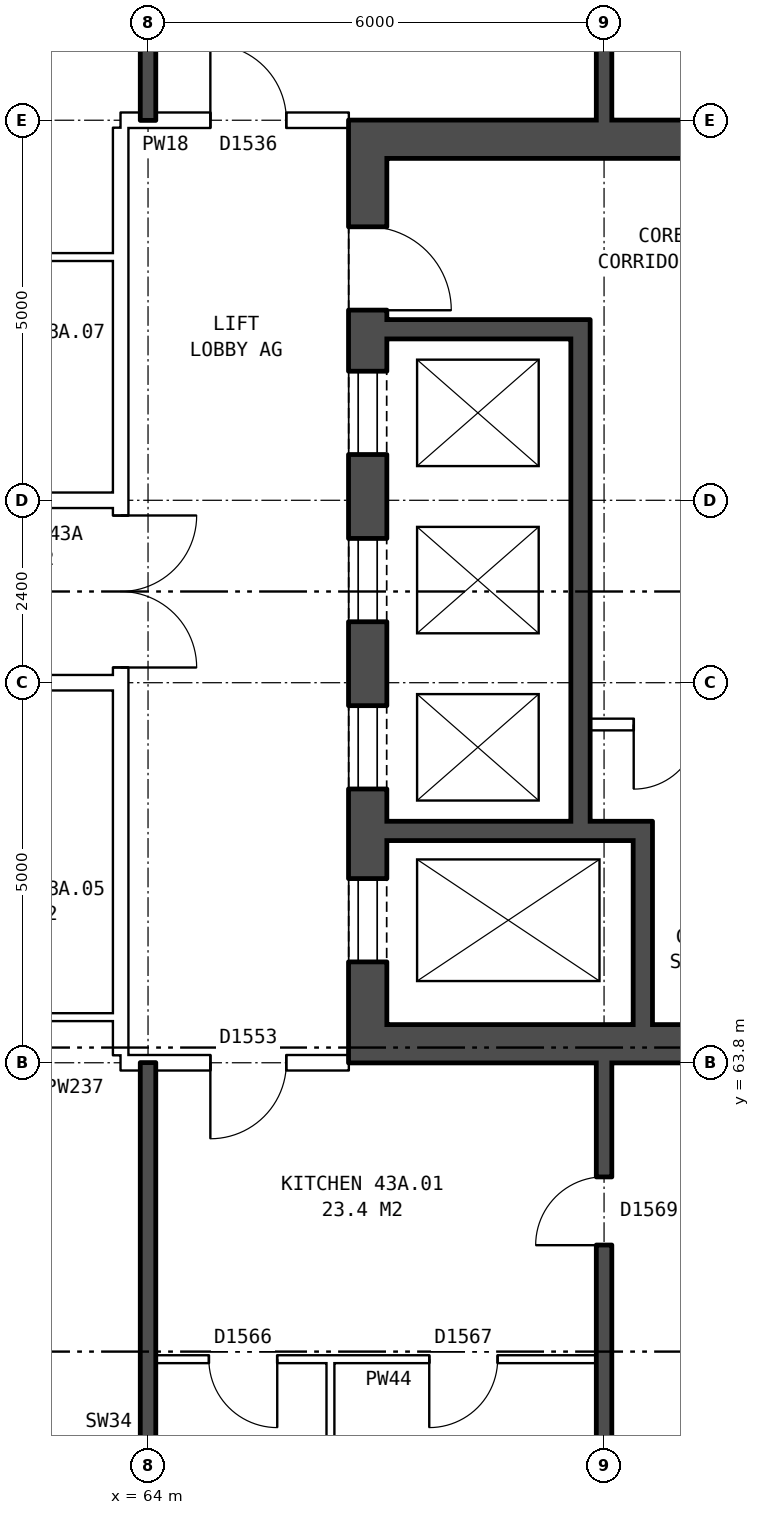
"""IFC4 building model, lengths in metres.
Left out: names, types, materials, properties, quantities, classifications, styles, units other than length and angle.
Written with IfcOpenShell. Run it as: python <this file> out.ifc"""

import sys

from ifc_helpers import new_model, si_unit, direction, frame, frame_2d, origin, place, context, subcontext, project, spatial, rectangle, extrude, element, fill, save


model = new_model("IFC4")
c1 = context("Model", 3, precision=1e-05, world=origin(), true_north=direction((0.0, 1.0)))
c2 = subcontext(c1, "Body", "Model", "MODEL_VIEW")
j1 = project(units=[si_unit("LENGTHUNIT", "METRE"), si_unit("PLANEANGLEUNIT", "RADIAN")], contexts=[c1])
p1 = place(None, origin())
s1 = spatial("IfcSite", under=j1, at=p1, CompositionType="ELEMENT")
p2 = place(p1, origin())
s2 = spatial("IfcBuilding", under=s1, at=p2, CompositionType="ELEMENT")
p3 = place(p2, frame((0.0, 0.0, 154.7)))
s3 = spatial("IfcBuildingStorey", under=s2, at=p3, CompositionType="ELEMENT", Elevation=154.7)
p4 = place(p3, frame((66.89, 63.8, 0.0), z_axis=(0.0, 0.0, 1.0), x_axis=(0.0, 1.0, 0.0)))
e1 = element("IfcWall", 1, at=p4, inside=s3, PredefinedType="SHEAR", context=c2, shape_type="SweptSolid", body=[
    extrude(rectangle(XDim=12.4, YDim=0.5, at=frame_2d((6.2, 0.0))), origin(), (0.0, 0.0, 1.0), 2.85),
])
p5 = place(p4, frame((1.325, 0.0, 0.0)))
e2 = element("IfcOpeningElement", 2, at=p5, cuts=e1, PredefinedType="OPENING", context=c2, shape_type="SweptSolid", body=[
    extrude(rectangle(XDim=1.1, YDim=2.1, at=frame_2d((0.55, 1.05))), frame((0.0, 0.26, 0.0), z_axis=(0.0, -1.0, 0.0), x_axis=(1.0, 0.0, 0.0)), (0.0, 0.0, 1.0), 0.52),
])
p6 = place(p4, frame((3.6, 0.0, 0.0)))
e3 = element("IfcOpeningElement", 3, at=p6, cuts=e1, PredefinedType="OPENING", context=c2, shape_type="SweptSolid", body=[
    extrude(rectangle(XDim=1.1, YDim=2.1, at=frame_2d((0.55, 1.05))), frame((0.0, 0.26, 0.0), z_axis=(0.0, -1.0, 0.0), x_axis=(1.0, 0.0, 0.0)), (0.0, 0.0, 1.0), 0.52),
])
p7 = place(p4, frame((5.8, 0.0, 0.0)))
e4 = element("IfcOpeningElement", 4, at=p7, cuts=e1, PredefinedType="OPENING", context=c2, shape_type="SweptSolid", body=[
    extrude(rectangle(XDim=1.1, YDim=2.1, at=frame_2d((0.55, 1.05))), frame((0.0, 0.26, 0.0), z_axis=(0.0, -1.0, 0.0), x_axis=(1.0, 0.0, 0.0)), (0.0, 0.0, 1.0), 0.52),
])
p8 = place(p4, frame((8.0, 0.0, 0.0)))
e5 = element("IfcOpeningElement", 5, at=p8, cuts=e1, PredefinedType="OPENING", context=c2, shape_type="SweptSolid", body=[
    extrude(rectangle(XDim=1.1, YDim=2.1, at=frame_2d((0.55, 1.05))), frame((0.0, 0.26, 0.0), z_axis=(0.0, -1.0, 0.0), x_axis=(1.0, 0.0, 0.0)), (0.0, 0.0, 1.0), 0.52),
])
p9 = place(p4, frame((9.9, 0.0, 0.0)))
e6 = element("IfcOpeningElement", 6, at=p9, cuts=e1, PredefinedType="OPENING", context=c2, shape_type="SweptSolid", body=[
    extrude(rectangle(XDim=1.1, YDim=2.1, at=frame_2d((0.55, 1.05))), frame((0.0, 0.26, 0.0), z_axis=(0.0, -1.0, 0.0), x_axis=(1.0, 0.0, 0.0)), (0.0, 0.0, 1.0), 0.52),
])
for number, where, z_axis, x_axis in (
    (7, (67.14, 64.05, 0.0), (0.0, 0.0, 1.0), (1.0, 0.0, 0.0)),
    (8, (67.14, 75.95, 0.0), (0.0, 0.0, 1.0), (1.0, 0.0, 0.0)),
):
    element("IfcWall", number, at=place(p3, frame(where, z_axis=z_axis, x_axis=x_axis)), inside=s3, PredefinedType="SHEAR", context=c2, shape_type="SweptSolid", body=[
        extrude(rectangle(XDim=8.0, YDim=0.5, at=frame_2d((4.0, 0.0))), origin(), (0.0, 0.0, 1.0), 2.85),
    ])
p10 = place(p3, frame((67.14, 66.85, 0.0), z_axis=(0.0, 0.0, 1.0), x_axis=(1.0, 0.0, 0.0)))
e9 = element("IfcWall", 9, at=p10, inside=s3, PredefinedType="SHEAR", context=c2, shape_type="SweptSolid", body=[
    extrude(rectangle(XDim=3.495, YDim=0.25, at=frame_2d((1.748, 0.0))), origin(), (0.0, 0.0, 1.0), 2.85),
])
p11 = place(p3, frame((69.815, 68.25, 0.0), z_axis=(0.0, 0.0, 1.0), x_axis=(1.0, 0.0, 0.0)))
e10 = element("IfcWall", 10, at=p11, inside=s3, PredefinedType="PARTITIONING", context=c2, shape_type="SweptSolid", body=[
    extrude(rectangle(XDim=2.0, YDim=0.15, at=frame_2d((1.0, 0.0))), origin(), (0.0, 0.0, 1.0), 2.85),
])
p12 = place(p11, frame((0.575, 0.0, 0.0)))
e11 = element("IfcOpeningElement", 11, at=p12, cuts=e10, PredefinedType="OPENING", context=c2, shape_type="SweptSolid", body=[
    extrude(rectangle(XDim=0.85, YDim=2.1, at=frame_2d((0.425, 1.05))), frame((0.0, 0.085, 0.0), z_axis=(0.0, -1.0, 0.0), x_axis=(1.0, 0.0, 0.0)), (0.0, 0.0, 1.0), 0.17),
])
p13 = place(p3, frame((67.14, 73.45, 0.0), z_axis=(0.0, 0.0, 1.0), x_axis=(1.0, 0.0, 0.0)))
e12 = element("IfcWall", 12, at=p13, inside=s3, PredefinedType="SHEAR", context=c2, shape_type="SweptSolid", body=[
    extrude(rectangle(XDim=2.425, YDim=0.25, at=frame_2d((1.212, 0.0))), origin(), (0.0, 0.0, 1.0), 2.85),
])
p14 = place(p3, frame((69.69, 66.975, 0.0), z_axis=(0.0, 0.0, 1.0), x_axis=(0.0, 1.0, 0.0)))
e13 = element("IfcWall", 13, at=p14, inside=s3, PredefinedType="SHEAR", context=c2, shape_type="SweptSolid", body=[
    extrude(rectangle(XDim=6.6, YDim=0.25, at=frame_2d((3.3, 0.0))), origin(), (0.0, 0.0, 1.0), 2.85),
])
p15 = place(p3, frame((70.51, 64.3, 0.0), z_axis=(0.0, 0.0, 1.0), x_axis=(0.0, 1.0, 0.0)))
e14 = element("IfcWall", 14, at=p15, inside=s3, PredefinedType="SHEAR", context=c2, shape_type="SweptSolid", body=[
    extrude(rectangle(XDim=2.425, YDim=0.25, at=frame_2d((1.212, 0.0))), origin(), (0.0, 0.0, 1.0), 2.85),
])
p16 = place(p3, frame((63.64, 63.9, 0.0), z_axis=(0.0, 0.0, 1.0), x_axis=(0.0, 1.0, 0.0)))
e15 = element("IfcWall", 15, at=p16, inside=s3, PredefinedType="PARTITIONING", context=c2, shape_type="SweptSolid", body=[
    extrude(rectangle(XDim=12.2, YDim=0.2, at=frame_2d((6.1, 0.0))), origin(), (0.0, 0.0, 1.0), 2.85),
])
p17 = place(p16, frame((5.1, 0.0, 0.0)))
e16 = element("IfcOpeningElement", 16, at=p17, cuts=e15, PredefinedType="OPENING", context=c2, shape_type="SweptSolid", body=[
    extrude(rectangle(XDim=2.0, YDim=2.1, at=frame_2d((1.0, 1.05))), frame((0.0, 0.11, 0.0), z_axis=(0.0, -1.0, 0.0), x_axis=(1.0, 0.0, 0.0)), (0.0, 0.0, 1.0), 0.22),
])
p18 = place(p3, frame((64.1, 59.9, 0.0), z_axis=(0.0, 0.0, 1.0), x_axis=(1.0, 0.0, 0.0)))
e17 = element("IfcWall", 17, at=p18, inside=s3, PredefinedType="PARTITIONING", context=c2, shape_type="SweptSolid", body=[
    extrude(rectangle(XDim=5.8, YDim=0.1, at=frame_2d((2.9, 0.0))), origin(), (0.0, 0.0, 1.0), 2.85),
])
p19 = place(p18, frame((3.6, 0.0, 0.0)))
e18 = element("IfcOpeningElement", 18, at=p19, cuts=e17, PredefinedType="OPENING", context=c2, shape_type="SweptSolid", body=[
    extrude(rectangle(XDim=0.9, YDim=2.1, at=frame_2d((0.45, 1.05))), frame((0.0, 0.06, 0.0), z_axis=(0.0, -1.0, 0.0), x_axis=(1.0, 0.0, 0.0)), (0.0, 0.0, 1.0), 0.12),
])
p20 = place(p18, frame((0.7, 0.0, 0.0)))
e19 = element("IfcOpeningElement", 19, at=p20, cuts=e17, PredefinedType="OPENING", context=c2, shape_type="SweptSolid", body=[
    extrude(rectangle(XDim=0.9, YDim=2.1, at=frame_2d((0.45, 1.05))), frame((0.0, 0.06, 0.0), z_axis=(0.0, -1.0, 0.0), x_axis=(1.0, 0.0, 0.0)), (0.0, 0.0, 1.0), 0.12),
])
p21 = place(p3, frame((63.64, 63.8, 0.0), z_axis=(0.0, 0.0, 1.0), x_axis=(1.0, 0.0, 0.0)))
e20 = element("IfcWall", 20, at=p21, inside=s3, PredefinedType="PARTITIONING", context=c2, shape_type="SweptSolid", body=[
    extrude(rectangle(XDim=3.0, YDim=0.2, at=frame_2d((1.5, 0.0))), origin(), (0.0, 0.0, 1.0), 2.85),
])
p22 = place(p21, frame((1.18, 0.0, 0.0)))
e21 = element("IfcOpeningElement", 21, at=p22, cuts=e20, PredefinedType="OPENING", context=c2, shape_type="SweptSolid", body=[
    extrude(rectangle(XDim=1.0, YDim=2.1, at=frame_2d((0.5, 1.05))), frame((0.0, 0.11, 0.0), z_axis=(0.0, -1.0, 0.0), x_axis=(1.0, 0.0, 0.0)), (0.0, 0.0, 1.0), 0.22),
])
p23 = place(p3, frame((61.0, 64.4, 0.0), z_axis=(0.0, 0.0, 1.0), x_axis=(1.0, 0.0, 0.0)))
e22 = element("IfcWall", 22, at=p23, inside=s3, PredefinedType="PARTITIONING", context=c2, shape_type="SweptSolid", body=[
    extrude(rectangle(XDim=2.64, YDim=0.1, at=frame_2d((1.32, 0.0))), origin(), (0.0, 0.0, 1.0), 2.85),
])
p24 = place(p3, frame((44.36, 68.8, 0.0), z_axis=(0.0, 0.0, 1.0), x_axis=(1.0, 0.0, 0.0)))
e23 = element("IfcWall", 23, at=p24, inside=s3, PredefinedType="PARTITIONING", context=c2, shape_type="SweptSolid", body=[
    extrude(rectangle(XDim=19.28, YDim=0.2, at=frame_2d((9.64, 0.0))), origin(), (0.0, 0.0, 1.0), 2.85),
])
p25 = place(p24, frame((14.64, 0.0, 0.0)))
e24 = element("IfcOpeningElement", 24, at=p25, cuts=e23, PredefinedType="OPENING", context=c2, shape_type="SweptSolid", body=[
    extrude(rectangle(XDim=1.0, YDim=2.1, at=frame_2d((0.5, 1.05))), frame((0.0, 0.11, 0.0), z_axis=(0.0, -1.0, 0.0), x_axis=(1.0, 0.0, 0.0)), (0.0, 0.0, 1.0), 0.22),
])
p26 = place(p24, frame((5.64, 0.0, 0.0)))
e25 = element("IfcOpeningElement", 25, at=p26, cuts=e23, PredefinedType="OPENING", context=c2, shape_type="SweptSolid", body=[
    extrude(rectangle(XDim=1.0, YDim=2.1, at=frame_2d((0.5, 1.05))), frame((0.0, 0.11, 0.0), z_axis=(0.0, -1.0, 0.0), x_axis=(1.0, 0.0, 0.0)), (0.0, 0.0, 1.0), 0.22),
])
p27 = place(p3, frame((44.36, 71.2, 0.0), z_axis=(0.0, 0.0, 1.0), x_axis=(1.0, 0.0, 0.0)))
e26 = element("IfcWall", 26, at=p27, inside=s3, PredefinedType="PARTITIONING", context=c2, shape_type="SweptSolid", body=[
    extrude(rectangle(XDim=19.28, YDim=0.2, at=frame_2d((9.64, 0.0))), origin(), (0.0, 0.0, 1.0), 2.85),
])
p28 = place(p27, frame((14.64, 0.0, 0.0)))
e27 = element("IfcOpeningElement", 27, at=p28, cuts=e26, PredefinedType="OPENING", context=c2, shape_type="SweptSolid", body=[
    extrude(rectangle(XDim=1.0, YDim=2.1, at=frame_2d((0.5, 1.05))), frame((0.0, 0.11, 0.0), z_axis=(0.0, -1.0, 0.0), x_axis=(1.0, 0.0, 0.0)), (0.0, 0.0, 1.0), 0.22),
])
p29 = place(p27, frame((5.64, 0.0, 0.0)))
e28 = element("IfcOpeningElement", 28, at=p29, cuts=e26, PredefinedType="OPENING", context=c2, shape_type="SweptSolid", body=[
    extrude(rectangle(XDim=1.0, YDim=2.1, at=frame_2d((0.5, 1.05))), frame((0.0, 0.11, 0.0), z_axis=(0.0, -1.0, 0.0), x_axis=(1.0, 0.0, 0.0)), (0.0, 0.0, 1.0), 0.22),
])
p30 = place(p3, frame((61.0, 74.4, 0.0), z_axis=(0.0, 0.0, 1.0), x_axis=(1.0, 0.0, 0.0)))
e29 = element("IfcWall", 29, at=p30, inside=s3, PredefinedType="PARTITIONING", context=c2, shape_type="SweptSolid", body=[
    extrude(rectangle(XDim=2.64, YDim=0.1, at=frame_2d((1.32, 0.0))), origin(), (0.0, 0.0, 1.0), 2.85),
])
p31 = place(p3, frame((63.64, 76.2, 0.0), z_axis=(0.0, 0.0, 1.0), x_axis=(1.0, 0.0, 0.0)))
e30 = element("IfcWall", 30, at=p31, inside=s3, PredefinedType="PARTITIONING", context=c2, shape_type="SweptSolid", body=[
    extrude(rectangle(XDim=3.0, YDim=0.2, at=frame_2d((1.5, 0.0))), origin(), (0.0, 0.0, 1.0), 2.85),
])
p32 = place(p31, frame((1.18, 0.0, 0.0)))
e31 = element("IfcOpeningElement", 31, at=p32, cuts=e30, PredefinedType="OPENING", context=c2, shape_type="SweptSolid", body=[
    extrude(rectangle(XDim=1.0, YDim=2.1, at=frame_2d((0.5, 1.05))), frame((0.0, 0.11, 0.0), z_axis=(0.0, -1.0, 0.0), x_axis=(1.0, 0.0, 0.0)), (0.0, 0.0, 1.0), 0.22),
])
for number, where, z_axis, x_axis in (
    (32, (64.0, 54.36, 0.0), (0.0, 0.0, 1.0), (0.0, 1.0, 0.0)),
    (33, (64.0, 76.2, 0.0), (0.0, 0.0, 1.0), (0.0, 1.0, 0.0)),
):
    element("IfcWall", number, at=place(p3, frame(where, z_axis=z_axis, x_axis=x_axis)), inside=s3, PredefinedType="SOLIDWALL", context=c2, shape_type="SweptSolid", body=[
        extrude(rectangle(XDim=9.44, YDim=0.2, at=frame_2d((4.72, 0.0))), origin(), (0.0, 0.0, 1.0), 2.85),
    ])
p33 = place(p3, frame((66.4, 57.45, 0.0), z_axis=(0.0, 0.0, 1.0), x_axis=(0.0, 1.0, 0.0)))
e34 = element("IfcWall", 34, at=p33, inside=s3, PredefinedType="PARTITIONING", context=c2, shape_type="SweptSolid", body=[
    extrude(rectangle(XDim=2.4, YDim=0.1, at=frame_2d((1.2, 0.0))), origin(), (0.0, 0.0, 1.0), 2.85),
])
p34 = place(p3, frame((70.0, 54.36, 0.0), z_axis=(0.0, 0.0, 1.0), x_axis=(0.0, 1.0, 0.0)))
e35 = element("IfcWall", 35, at=p34, inside=s3, PredefinedType="SOLIDWALL", context=c2, shape_type="SweptSolid", body=[
    extrude(rectangle(XDim=9.44, YDim=0.2, at=frame_2d((4.72, 0.0))), origin(), (0.0, 0.0, 1.0), 2.85),
])
p35 = place(p34, frame((7.04, 0.0, 0.0)))
e36 = element("IfcOpeningElement", 36, at=p35, cuts=e35, PredefinedType="OPENING", context=c2, shape_type="SweptSolid", body=[
    extrude(rectangle(XDim=0.9, YDim=2.1, at=frame_2d((0.45, 1.05))), frame((0.0, 0.11, 0.0), z_axis=(0.0, -1.0, 0.0), x_axis=(1.0, 0.0, 0.0)), (0.0, 0.0, 1.0), 0.22),
])
p36 = place(p3, frame((70.0, 76.2, 0.0), z_axis=(0.0, 0.0, 1.0), x_axis=(0.0, 1.0, 0.0)))
e37 = element("IfcWall", 37, at=p36, inside=s3, PredefinedType="SOLIDWALL", context=c2, shape_type="SweptSolid", body=[
    extrude(rectangle(XDim=9.44, YDim=0.2, at=frame_2d((4.72, 0.0))), origin(), (0.0, 0.0, 1.0), 2.85),
])
p37 = place(p36, frame((6.22, 0.0, 0.0)))
e38 = element("IfcOpeningElement", 38, at=p37, cuts=e37, PredefinedType="OPENING", context=c2, shape_type="SweptSolid", body=[
    extrude(rectangle(XDim=0.9, YDim=2.1, at=frame_2d((0.45, 1.05))), frame((0.0, 0.11, 0.0), z_axis=(0.0, -1.0, 0.0), x_axis=(1.0, 0.0, 0.0)), (0.0, 0.0, 1.0), 0.22),
])
p38 = place(p36, frame((0.95, 0.0, 0.0)))
e39 = element("IfcOpeningElement", 39, at=p38, cuts=e37, PredefinedType="OPENING", context=c2, shape_type="SweptSolid", body=[
    extrude(rectangle(XDim=0.9, YDim=2.1, at=frame_2d((0.45, 1.05))), frame((0.0, 0.11, 0.0), z_axis=(0.0, -1.0, 0.0), x_axis=(1.0, 0.0, 0.0)), (0.0, 0.0, 1.0), 0.22),
])
p39 = place(p5, origin())
e40 = element("IfcDoor", 40, at=p39, inside=s3, OperationType="DOUBLE_DOOR_SLIDING", PredefinedType="DOOR", context=c2, shape_type="SweptSolid", body=[
    extrude(rectangle(XDim=1.1, YDim=2.1, at=frame_2d((0.55, 1.05))), frame((0.0, -0.185, 0.0), z_axis=(0.0, -1.0, 0.0), x_axis=(1.0, 0.0, 0.0)), (0.0, 0.0, 1.0), 0.05),
])
fill(e2, e40)
p40 = place(p6, origin())
e41 = element("IfcDoor", 41, at=p40, inside=s3, OperationType="DOUBLE_DOOR_SLIDING", PredefinedType="DOOR", context=c2, shape_type="SweptSolid", body=[
    extrude(rectangle(XDim=1.1, YDim=2.1, at=frame_2d((0.55, 1.05))), frame((0.0, -0.185, 0.0), z_axis=(0.0, -1.0, 0.0), x_axis=(1.0, 0.0, 0.0)), (0.0, 0.0, 1.0), 0.05),
])
fill(e3, e41)
p41 = place(p7, origin())
e42 = element("IfcDoor", 42, at=p41, inside=s3, OperationType="DOUBLE_DOOR_SLIDING", PredefinedType="DOOR", context=c2, shape_type="SweptSolid", body=[
    extrude(rectangle(XDim=1.1, YDim=2.1, at=frame_2d((0.55, 1.05))), frame((0.0, -0.185, 0.0), z_axis=(0.0, -1.0, 0.0), x_axis=(1.0, 0.0, 0.0)), (0.0, 0.0, 1.0), 0.05),
])
fill(e4, e42)
p42 = place(p8, origin())
e43 = element("IfcDoor", 43, at=p42, inside=s3, OperationType="DOUBLE_DOOR_SLIDING", PredefinedType="DOOR", context=c2, shape_type="SweptSolid", body=[
    extrude(rectangle(XDim=1.1, YDim=2.1, at=frame_2d((0.55, 1.05))), frame((0.0, -0.185, 0.0), z_axis=(0.0, -1.0, 0.0), x_axis=(1.0, 0.0, 0.0)), (0.0, 0.0, 1.0), 0.05),
])
fill(e5, e43)
p43 = place(p9, frame((1.1, 0.0, 0.0), z_axis=(0.0, 0.0, 1.0), x_axis=(-1.0, 0.0, 0.0)))
e44 = element("IfcDoor", 44, at=p43, inside=s3, OperationType="SINGLE_SWING_RIGHT", PredefinedType="DOOR", context=c2, shape_type="SweptSolid", body=[
    extrude(rectangle(XDim=1.1, YDim=2.1, at=frame_2d((0.55, 1.05))), frame((0.0, 0.235, 0.0), z_axis=(0.0, -1.0, 0.0), x_axis=(1.0, 0.0, 0.0)), (0.0, 0.0, 1.0), 0.05),
])
fill(e6, e44)
p44 = place(p12, frame((0.85, 0.0, 0.0), z_axis=(0.0, 0.0, 1.0), x_axis=(-1.0, 0.0, 0.0)))
e45 = element("IfcDoor", 45, at=p44, inside=s3, OperationType="SINGLE_SWING_RIGHT", PredefinedType="DOOR", context=c2, shape_type="SweptSolid", body=[
    extrude(rectangle(XDim=0.85, YDim=2.1, at=frame_2d((0.425, 1.05))), frame((0.0, 0.025, 0.0), z_axis=(0.0, -1.0, 0.0), x_axis=(1.0, 0.0, 0.0)), (0.0, 0.0, 1.0), 0.05),
])
fill(e11, e45)
p45 = place(p17, frame((2.0, 0.0, 0.0), z_axis=(0.0, 0.0, 1.0), x_axis=(-1.0, 0.0, 0.0)))
e46 = element("IfcDoor", 46, at=p45, inside=s3, OperationType="DOUBLE_DOOR_SINGLE_SWING", PredefinedType="DOOR", context=c2, shape_type="SweptSolid", body=[
    extrude(rectangle(XDim=2.0, YDim=2.1, at=frame_2d((1.0, 1.05))), frame((0.0, 0.025, 0.0), z_axis=(0.0, -1.0, 0.0), x_axis=(1.0, 0.0, 0.0)), (0.0, 0.0, 1.0), 0.05),
])
fill(e16, e46)
p46 = place(p19, frame((0.9, 0.0, 0.0), z_axis=(0.0, 0.0, 1.0), x_axis=(-1.0, 0.0, 0.0)))
e47 = element("IfcDoor", 47, at=p46, inside=s3, OperationType="SINGLE_SWING_RIGHT", PredefinedType="DOOR", context=c2, shape_type="SweptSolid", body=[
    extrude(rectangle(XDim=0.9, YDim=2.1, at=frame_2d((0.45, 1.05))), frame((0.0, 0.025, 0.0), z_axis=(0.0, -1.0, 0.0), x_axis=(1.0, 0.0, 0.0)), (0.0, 0.0, 1.0), 0.05),
])
fill(e18, e47)
p47 = place(p22, frame((1.0, 0.0, 0.0), z_axis=(0.0, 0.0, 1.0), x_axis=(-1.0, 0.0, 0.0)))
e48 = element("IfcDoor", 48, at=p47, inside=s3, OperationType="SINGLE_SWING_RIGHT", PredefinedType="DOOR", context=c2, shape_type="SweptSolid", body=[
    extrude(rectangle(XDim=1.0, YDim=2.1, at=frame_2d((0.5, 1.05))), frame((0.0, 0.025, 0.0), z_axis=(0.0, -1.0, 0.0), x_axis=(1.0, 0.0, 0.0)), (0.0, 0.0, 1.0), 0.05),
])
fill(e21, e48)
p48 = place(p35, origin())
e49 = element("IfcDoor", 49, at=p48, inside=s3, OperationType="SINGLE_SWING_LEFT", PredefinedType="DOOR", context=c2, shape_type="SweptSolid", body=[
    extrude(rectangle(XDim=0.9, YDim=2.1, at=frame_2d((0.45, 1.05))), frame((0.0, 0.025, 0.0), z_axis=(0.0, -1.0, 0.0), x_axis=(1.0, 0.0, 0.0)), (0.0, 0.0, 1.0), 0.05),
])
fill(e36, e49)
p49 = place(p20, frame((0.9, 0.0, 0.0), z_axis=(0.0, 0.0, 1.0), x_axis=(-1.0, 0.0, 0.0)))
e50 = element("IfcDoor", 50, at=p49, inside=s3, OperationType="SINGLE_SWING_LEFT", PredefinedType="DOOR", context=c2, shape_type="SweptSolid", body=[
    extrude(rectangle(XDim=0.9, YDim=2.1, at=frame_2d((0.45, 1.05))), frame((0.0, 0.025, 0.0), z_axis=(0.0, -1.0, 0.0), x_axis=(1.0, 0.0, 0.0)), (0.0, 0.0, 1.0), 0.05),
])
fill(e19, e50)
p50 = place(p32, origin())
e51 = element("IfcDoor", 51, at=p50, inside=s3, OperationType="SINGLE_SWING_LEFT", PredefinedType="DOOR", context=c2, shape_type="SweptSolid", body=[
    extrude(rectangle(XDim=1.0, YDim=2.1, at=frame_2d((0.5, 1.05))), frame((0.0, 0.025, 0.0), z_axis=(0.0, -1.0, 0.0), x_axis=(1.0, 0.0, 0.0)), (0.0, 0.0, 1.0), 0.05),
])
fill(e31, e51)
save(model, sys.argv[1])
